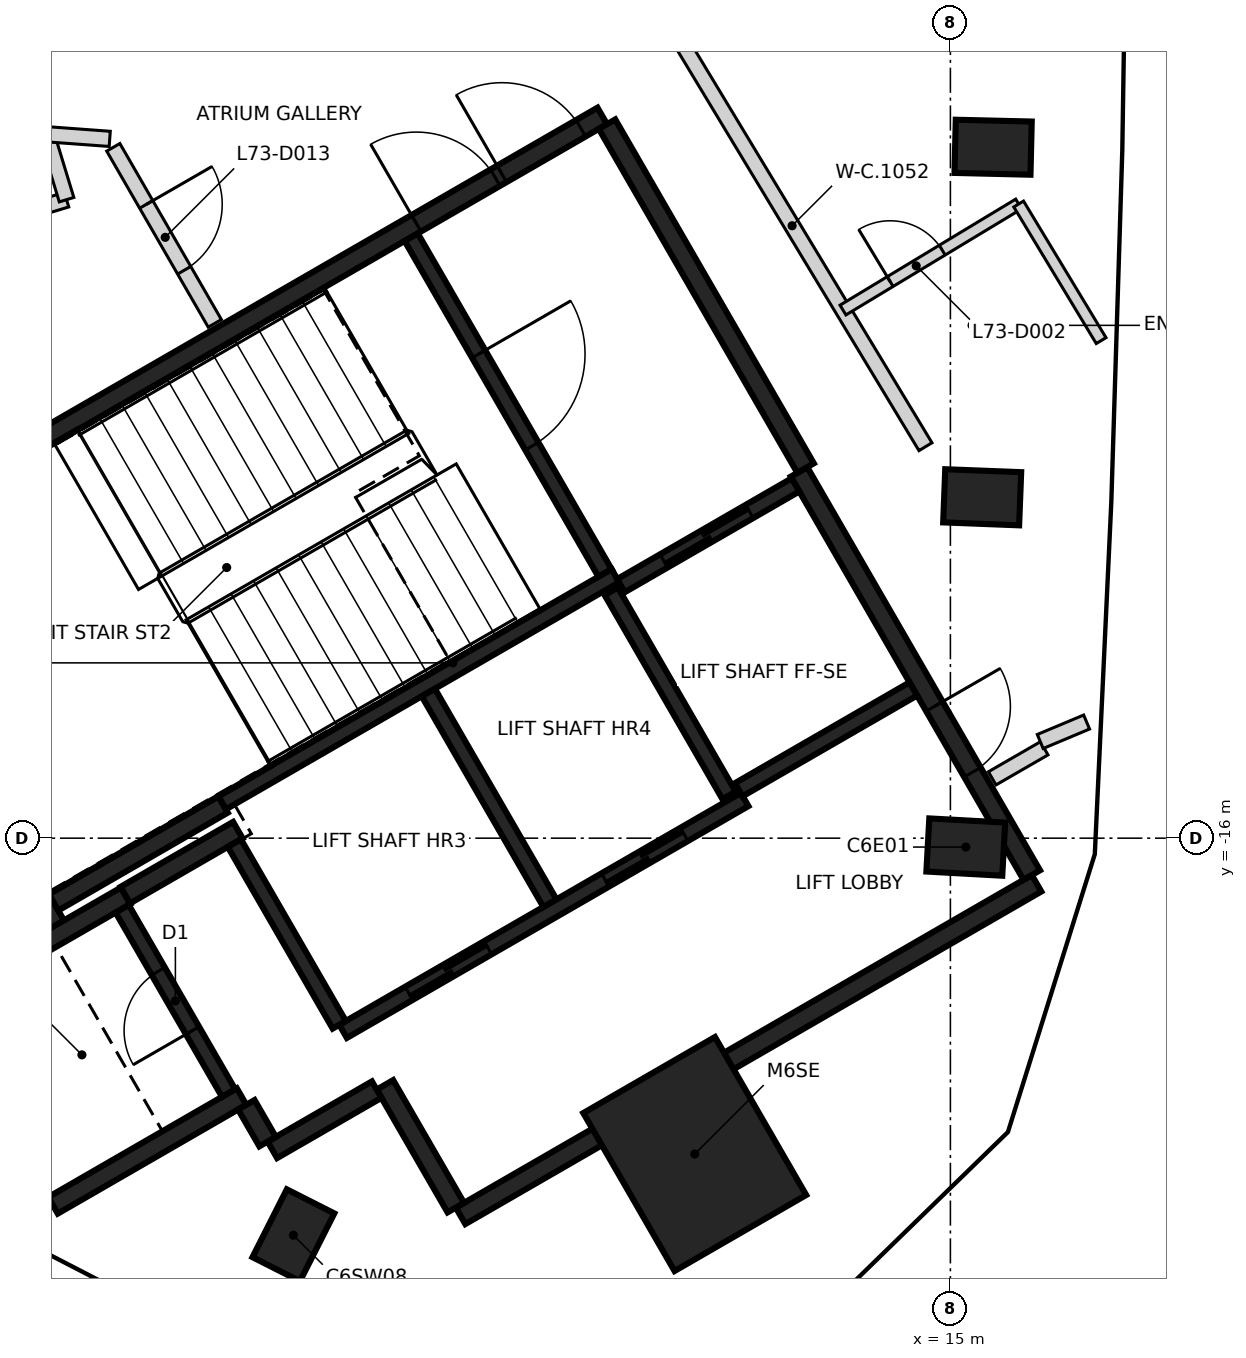
"""IFC4 building model, lengths in metres.
Left out: names, types, materials, properties, quantities, classifications, styles, units other than length and angle.
Written with IfcOpenShell. Run it as: python <this file> out.ifc"""

import sys

from ifc_helpers import new_model, si_unit, direction, frame, frame_2d, origin, origin_2d, place, context, subcontext, project, spatial, rectangle, extrude, element, fill, save


model = new_model("IFC4")
c1 = context("Model", 3, precision=1e-05, world=origin(), true_north=direction((0.0, 1.0)))
c2 = subcontext(c1, "Body", "Model", "MODEL_VIEW")
j1 = project(units=[si_unit("LENGTHUNIT", "METRE"), si_unit("PLANEANGLEUNIT", "RADIAN")], contexts=[c1])
p1 = place(None, origin())
s1 = spatial("IfcSite", under=j1, at=p1, CompositionType="ELEMENT")
p2 = place(p1, origin())
s2 = spatial("IfcBuilding", under=s1, at=p2, CompositionType="ELEMENT")
p3 = place(p2, frame((0.0, 0.0, 291.0)))
s3 = spatial("IfcBuildingStorey", under=s2, at=p3, CompositionType="ELEMENT", Elevation=291.0)
for number, where, z_axis, x_axis in (
    (1, (15.202, -16.117, -0.35), (0.0, 0.0, 1.0), (-0.998, 0.055, 0.0)),
    (2, (15.418, -11.515, -0.35), (0.0, 0.0, 1.0), (-0.999, 0.039, 0.0)),
    (3, (15.562, -6.91, -0.35), (0.0, 0.0, 1.0), (-1.0, 0.024, 0.0)),
    (4, (6.356, -21.224, -0.35), (0.0, 0.0, 1.0), (0.452, 0.892, 0.0)),
):
    element("IfcColumn", number, at=place(p3, frame(where, z_axis=z_axis, x_axis=x_axis)), inside=s3, PredefinedType="COLUMN", context=c2, shape_type="SweptSolid", body=[
        extrude(rectangle(XDim=1.0, YDim=0.7, at=origin_2d()), origin(), (0.0, 0.0, 1.0), 3.6),
    ])
p4 = place(p3, frame((11.637, -20.155, -0.35), z_axis=(0.0, 0.0, 1.0), x_axis=(-0.5, 0.866025403784, 0.0)))
e5 = element("IfcColumn", 5, at=p4, inside=s3, PredefinedType="COLUMN", context=c2, shape_type="SweptSolid", body=[
    extrude(rectangle(XDim=2.4, YDim=2.0, at=origin_2d()), origin(), (0.0, 0.0, 1.0), 3.6),
])
p5 = place(p3, frame((0.417, -12.273, 0.0), z_axis=(0.0, 0.0, 1.0), x_axis=(0.866021906294, 0.500006057782, 0.0)))
e6 = element("IfcWall", 6, at=p5, inside=s3, PredefinedType="SHEAR", context=c2, shape_type="SweptSolid", body=[
    extrude(rectangle(XDim=11.55, YDim=0.25, at=frame_2d((5.775, 0.0))), origin(), (0.0, 0.0, 1.0), 3.25),
])
p6 = place(p5, frame((10.025, 0.0, 0.0)))
e7 = element("IfcOpeningElement", 7, at=p6, cuts=e6, PredefinedType="OPENING", context=c2, shape_type="SweptSolid", body=[
    extrude(rectangle(XDim=1.2, YDim=2.1, at=frame_2d((0.6, 1.05))), frame((0.0, 0.135, 0.0), z_axis=(0.0, -1.0, 0.0), x_axis=(1.0, 0.0, 0.0)), (0.0, 0.0, 1.0), 0.27),
])
p7 = place(p5, frame((8.725, 0.0, 0.0)))
e8 = element("IfcOpeningElement", 8, at=p7, cuts=e6, PredefinedType="OPENING", context=c2, shape_type="SweptSolid", body=[
    extrude(rectangle(XDim=1.2, YDim=2.1, at=frame_2d((0.6, 1.05))), frame((0.0, 0.135, 0.0), z_axis=(0.0, -1.0, 0.0), x_axis=(1.0, 0.0, 0.0)), (0.0, 0.0, 1.0), 0.27),
])
p8 = place(p3, frame((16.133, -16.594, 0.0), z_axis=(0.0, 0.0, 1.0), x_axis=(-0.866022959057, -0.500004234368, 0.0)))
e9 = element("IfcWall", 9, at=p8, inside=s3, PredefinedType="SHEAR", context=c2, shape_type="SweptSolid", body=[
    extrude(rectangle(XDim=8.75, YDim=0.25, at=frame_2d((4.375, 0.0))), origin(), (0.0, 0.0, 1.0), 3.25),
])
p9 = place(p3, frame((13.008, -11.181, 0.0), z_axis=(0.0, 0.0, 1.0), x_axis=(0.500001955336, -0.866024274868, 0.0)))
e10 = element("IfcWall", 10, at=p9, inside=s3, PredefinedType="SHEAR", context=c2, shape_type="SweptSolid", body=[
    extrude(rectangle(XDim=6.125, YDim=0.25, at=frame_2d((3.062, 0.0))), origin(), (0.0, 0.0, 1.0), 3.25),
])
p10 = place(p9, frame((3.563, 0.0, 0.0)))
e11 = element("IfcOpeningElement", 11, at=p10, cuts=e10, PredefinedType="OPENING", context=c2, shape_type="SweptSolid", body=[
    extrude(rectangle(XDim=1.0, YDim=2.1, at=frame_2d((0.5, 1.05))), frame((0.0, 0.135, 0.0), z_axis=(0.0, -1.0, 0.0), x_axis=(1.0, 0.0, 0.0)), (0.0, 0.0, 1.0), 0.27),
])
p11 = place(p3, frame((3.235, -17.153, 0.0), z_axis=(0.0, 0.0, 1.0), x_axis=(-0.500008851346, 0.866020293397, 0.0)))
e12 = element("IfcWall", 12, at=p11, inside=s3, PredefinedType="SHEAR", context=c2, shape_type="SweptSolid", body=[
    extrude(rectangle(XDim=5.51, YDim=0.25, at=frame_2d((2.755, 0.0))), origin(), (0.0, 0.0, 1.0), 3.25),
])
p12 = place(p3, frame((10.483, -6.606, 0.0), z_axis=(0.0, 0.0, 1.0), x_axis=(0.49999885962, -0.866026062182, 0.0)))
e13 = element("IfcWall", 13, at=p12, inside=s3, PredefinedType="SHEAR", context=c2, shape_type="SweptSolid", body=[
    extrude(rectangle(XDim=5.225, YDim=0.25, at=frame_2d((2.612, 0.0))), origin(), (0.0, 0.0, 1.0), 3.25),
])
p13 = place(p3, frame((3.085, -20.894, 0.0), z_axis=(0.0, 0.0, 1.0), x_axis=(-0.499978833458, 0.866037623948, 0.0)))
e14 = element("IfcWall", 14, at=p13, inside=s3, PredefinedType="SHEAR", context=c2, shape_type="SweptSolid", body=[
    extrude(rectangle(XDim=3.05, YDim=0.25, at=frame_2d((1.525, 0.0))), origin(), (0.0, 0.0, 1.0), 3.25),
])
p14 = place(p3, frame((1.669, -18.19, 0.0), z_axis=(0.0, 0.0, 1.0), x_axis=(0.866042235819, 0.499970844928, 0.0)))
e15 = element("IfcWall", 15, at=p14, inside=s3, PredefinedType="SHEAR", context=c2, shape_type="SweptSolid", body=[
    extrude(rectangle(XDim=2.865, YDim=0.25, at=frame_2d((1.432, 0.0))), origin(), (0.0, 0.0, 1.0), 3.25),
])
p15 = place(p3, frame((5.675, -19.399, 0.0), z_axis=(0.0, 0.0, 1.0), x_axis=(-0.866026637627, -0.499997862916, 0.0)))
e16 = element("IfcWall", 16, at=p15, inside=s3, PredefinedType="SHEAR", context=c2, shape_type="SweptSolid", body=[
    extrude(rectangle(XDim=2.865, YDim=0.25, at=frame_2d((1.432, 0.0))), origin(), (0.0, 0.0, 1.0), 3.25),
])
p16 = place(p3, frame((5.431, -15.556, 0.0), z_axis=(0.0, 0.0, 1.0), x_axis=(-0.866022940537, -0.500004266446, 0.0)))
e17 = element("IfcWall", 17, at=p16, inside=s3, PredefinedType="SHEAR", context=c2, shape_type="SweptSolid", body=[
    extrude(rectangle(XDim=2.575, YDim=0.25, at=frame_2d((1.287, 0.0))), origin(), (0.0, 0.0, 1.0), 3.25),
])
p17 = place(p3, frame((8.493, -20.86, 0.0), z_axis=(0.0, 0.0, 1.0), x_axis=(-0.500039802285, 0.866002422705, 0.0)))
e18 = element("IfcWall", 18, at=p17, inside=s3, PredefinedType="SHEAR", context=c2, shape_type="SweptSolid", body=[
    extrude(rectangle(XDim=1.865, YDim=0.25, at=frame_2d((0.932, 0.0))), origin(), (0.0, 0.0, 1.0), 3.25),
])
p18 = place(p3, frame((4.145, -16.749, 0.0), z_axis=(0.0, 0.0, 1.0), x_axis=(0.866038183914, 0.499977863513, 0.0)))
e19 = element("IfcWall", 19, at=p18, inside=s3, PredefinedType="SHEAR", context=c2, shape_type="SweptSolid", body=[
    extrude(rectangle(XDim=1.71, YDim=0.25, at=frame_2d((0.855, 0.0))), origin(), (0.0, 0.0, 1.0), 3.25),
])
p19 = place(p3, frame((7.452, -19.308, 0.0), z_axis=(0.0, 0.0, 1.0), x_axis=(-0.866044474677, -0.49996696679, 0.0)))
e20 = element("IfcWall", 20, at=p19, inside=s3, PredefinedType="SHEAR", context=c2, shape_type="SweptSolid", body=[
    extrude(rectangle(XDim=1.584, YDim=0.25, at=frame_2d((0.792, 0.0))), origin(), (0.0, 0.0, 1.0), 3.25),
])
p20 = place(p3, frame((6.017, -19.992, 0.0), z_axis=(0.0, 0.0, 1.0), x_axis=(-0.500364886717, 0.865814633822, 0.0)))
e21 = element("IfcWall", 21, at=p20, inside=s3, PredefinedType="SHEAR", context=c2, shape_type="SweptSolid", body=[
    extrude(rectangle(XDim=0.559, YDim=0.25, at=frame_2d((0.28, 0.0))), origin(), (0.0, 0.0, 1.0), 3.25),
])
p21 = place(p3, frame((5.419, -15.534, 0.0), z_axis=(0.0, 0.0, 1.0), x_axis=(0.866029065029, 0.499993658486, 0.0)))
e22 = element("IfcWall", 22, at=p21, inside=s3, PredefinedType="SHEAR", context=c2, shape_type="SweptSolid", body=[
    extrude(rectangle(XDim=5.974, YDim=0.2, at=frame_2d((2.987, 0.0))), origin(), (0.0, 0.0, 1.0), 3.25),
])
p22 = place(p3, frame((7.01, -18.542, 0.0), z_axis=(0.0, 0.0, 1.0), x_axis=(0.866030299012, 0.499991521122, 0.0)))
e23 = element("IfcWall", 23, at=p22, inside=s3, PredefinedType="SHEAR", context=c2, shape_type="SweptSolid", body=[
    extrude(rectangle(XDim=6.1, YDim=0.2, at=frame_2d((3.05, 0.0))), origin(), (0.0, 0.0, 1.0), 3.25),
])
p23 = place(p22, frame((1.0, 0.0, 0.0)))
e24 = element("IfcOpeningElement", 24, at=p23, cuts=e23, PredefinedType="OPENING", context=c2, shape_type="SweptSolid", body=[
    extrude(rectangle(XDim=1.2, YDim=2.1, at=frame_2d((0.6, 1.05))), frame((0.0, 0.11, 0.0), z_axis=(0.0, -1.0, 0.0), x_axis=(1.0, 0.0, 0.0)), (0.0, 0.0, 1.0), 0.22),
])
p24 = place(p22, frame((3.982, 0.0, 0.0)))
e25 = element("IfcOpeningElement", 25, at=p24, cuts=e23, PredefinedType="OPENING", context=c2, shape_type="SweptSolid", body=[
    extrude(rectangle(XDim=1.2, YDim=2.1, at=frame_2d((0.6, 1.05))), frame((0.0, 0.11, 0.0), z_axis=(0.0, -1.0, 0.0), x_axis=(1.0, 0.0, 0.0)), (0.0, 0.0, 1.0), 0.22),
])
p25 = place(p3, frame((7.906, -8.094, 0.0), z_axis=(0.0, 0.0, 1.0), x_axis=(0.500027839223, -0.866009330205, 0.0)))
e26 = element("IfcWall", 26, at=p25, inside=s3, PredefinedType="SHEAR", context=c2, shape_type="SweptSolid", body=[
    extrude(rectangle(XDim=5.098, YDim=0.2, at=frame_2d((2.549, 0.0))), origin(), (0.0, 0.0, 1.0), 3.25),
])
p26 = place(p25, frame((1.774, 0.0, 0.0)))
e27 = element("IfcOpeningElement", 27, at=p26, cuts=e26, PredefinedType="OPENING", context=c2, shape_type="SweptSolid", body=[
    extrude(rectangle(XDim=1.4, YDim=2.1, at=frame_2d((0.7, 1.05))), frame((0.0, 0.11, 0.0), z_axis=(0.0, -1.0, 0.0), x_axis=(1.0, 0.0, 0.0)), (0.0, 0.0, 1.0), 0.22),
])
p27 = place(p3, frame((8.132, -14.084, 0.0), z_axis=(0.0, 0.0, 1.0), x_axis=(0.499997778408, -0.866026686418, 0.0)))
e28 = element("IfcWall", 28, at=p27, inside=s3, PredefinedType="SHEAR", context=c2, shape_type="SweptSolid", body=[
    extrude(rectangle(XDim=3.198, YDim=0.2, at=frame_2d((1.599, 0.0))), origin(), (0.0, 0.0, 1.0), 3.25),
])
p28 = place(p3, frame((5.503, -19.352, 0.0), z_axis=(0.0, 0.0, 1.0), x_axis=(-0.499986818241, 0.866033014143, 0.0)))
e29 = element("IfcWall", 29, at=p28, inside=s3, PredefinedType="SHEAR", context=c2, shape_type="SweptSolid", body=[
    extrude(rectangle(XDim=2.798, YDim=0.2, at=frame_2d((1.399, 0.0))), origin(), (0.0, 0.0, 1.0), 3.25),
])
p29 = place(p28, frame((0.949, 0.0, 0.0)))
e30 = element("IfcOpeningElement", 30, at=p29, cuts=e29, PredefinedType="OPENING", context=c2, shape_type="SweptSolid", body=[
    extrude(rectangle(XDim=0.9, YDim=2.1, at=frame_2d((0.45, 1.05))), frame((0.0, 0.11, 0.0), z_axis=(0.0, -1.0, 0.0), x_axis=(1.0, 0.0, 0.0)), (0.0, 0.0, 1.0), 0.22),
])
p30 = place(p3, frame((6.96, -18.455, 0.0), z_axis=(0.0, 0.0, 1.0), x_axis=(-0.499926705758, 0.866067716099, 0.0)))
e31 = element("IfcWall", 31, at=p30, inside=s3, PredefinedType="SHEAR", context=c2, shape_type="SweptSolid", body=[
    extrude(rectangle(XDim=2.759, YDim=0.2, at=frame_2d((1.38, 0.0))), origin(), (0.0, 0.0, 1.0), 3.25),
])
p31 = place(p3, frame((12.088, -15.437, 0.0), z_axis=(0.0, 0.0, 1.0), x_axis=(-0.500026960575, 0.86600983753, 0.0)))
e32 = element("IfcWall", 32, at=p31, inside=s3, PredefinedType="SHEAR", context=c2, shape_type="SweptSolid", body=[
    extrude(rectangle(XDim=3.1, YDim=0.2, at=frame_2d((1.55, 0.0))), origin(), (0.0, 0.0, 1.0), 3.25),
])
p32 = place(p3, frame((10.666, -12.678, 0.0), z_axis=(0.0, 0.0, 1.0), x_axis=(0.866018407898, 0.500012117035, 0.0)))
e33 = element("IfcWall", 33, at=p32, inside=s3, PredefinedType="SHEAR", context=c2, shape_type="SweptSolid", body=[
    extrude(rectangle(XDim=2.651, YDim=0.2, at=frame_2d((1.325, 0.0))), origin(), (0.0, 0.0, 1.0), 3.25),
])
p33 = place(p32, frame((0.652, 0.0, 0.0)))
e34 = element("IfcOpeningElement", 34, at=p33, cuts=e33, PredefinedType="OPENING", context=c2, shape_type="SweptSolid", body=[
    extrude(rectangle(XDim=1.3, YDim=2.1, at=frame_2d((0.65, 1.05))), frame((0.0, 0.11, 0.0), z_axis=(0.0, -1.0, 0.0), x_axis=(1.0, 0.0, 0.0)), (0.0, 0.0, 1.0), 0.22),
])
p34 = place(p3, frame((14.512, -14.037, 0.0), z_axis=(0.0, 0.0, 1.0), x_axis=(-0.866018407898, -0.500012117035, 0.0)))
e35 = element("IfcWall", 35, at=p34, inside=s3, PredefinedType="SHEAR", context=c2, shape_type="SweptSolid", body=[
    extrude(rectangle(XDim=2.651, YDim=0.2, at=frame_2d((1.325, 0.0))), origin(), (0.0, 0.0, 1.0), 3.25),
])
p35 = place(p3, frame((2.591, -7.837, 0.0), z_axis=(0.0, 0.0, 1.0), x_axis=(0.956974070788, 0.290173444409, 0.0)))
e36 = element("IfcWall", 36, at=p35, inside=s3, PredefinedType="PARTITIONING", context=c2, shape_type="SweptSolid", body=[
    extrude(rectangle(XDim=0.816, YDim=0.2, at=frame_2d((0.408, 0.0))), origin(), (0.0, 0.0, 1.0), 3.25),
])
p36 = place(p3, frame((3.11, -6.739, 0.0), z_axis=(0.0, 0.0, 1.0), x_axis=(0.291053676179, -0.95670672496, 0.0)))
e37 = element("IfcWall", 37, at=p36, inside=s3, PredefinedType="PARTITIONING", context=c2, shape_type="SweptSolid", body=[
    extrude(rectangle(XDim=0.9, YDim=0.2, at=frame_2d((0.45, 0.0))), origin(), (0.0, 0.0, 1.0), 3.25),
])
p37 = place(p3, frame((3.11, -6.739, 0.0), z_axis=(0.0, 0.0, 1.0), x_axis=(0.997306047238, -0.073352901386, 0.0)))
e38 = element("IfcWall", 38, at=p37, inside=s3, PredefinedType="PARTITIONING", context=c2, shape_type="SweptSolid", body=[
    extrude(rectangle(XDim=0.832, YDim=0.2, at=frame_2d((0.416, 0.0))), origin(), (0.0, 0.0, 1.0), 3.25),
])
p38 = place(p3, frame((3.987, -6.911, 0.0), z_axis=(0.0, 0.0, 1.0), x_axis=(0.499458942258, -0.866337558345, 0.0)))
e39 = element("IfcWall", 39, at=p38, inside=s3, PredefinedType="PARTITIONING", context=c2, shape_type="SweptSolid", body=[
    extrude(rectangle(XDim=2.674, YDim=0.2, at=frame_2d((1.337, 0.0))), origin(), (0.0, 0.0, 1.0), 3.25),
])
p39 = place(p38, frame((0.867, 0.0, 0.0)))
e40 = element("IfcOpeningElement", 40, at=p39, cuts=e39, PredefinedType="OPENING", context=c2, shape_type="SweptSolid", body=[
    extrude(rectangle(XDim=1.0, YDim=2.1, at=frame_2d((0.5, 1.05))), frame((0.0, 0.11, 0.0), z_axis=(0.0, -1.0, 0.0), x_axis=(1.0, 0.0, 0.0)), (0.0, 0.0, 1.0), 0.22),
])
p40 = place(p3, frame((11.163, -5.036, 0.0), z_axis=(0.0, 0.0, 1.0), x_axis=(0.516730398198, -0.856148173845, 0.0)))
e41 = element("IfcWall", 41, at=p40, inside=s3, PredefinedType="PARTITIONING", context=c2, shape_type="SweptSolid", body=[
    extrude(rectangle(XDim=6.791, YDim=0.2, at=frame_2d((3.396, 0.0))), origin(), (0.0, 0.0, 1.0), 3.25),
])
p41 = place(p3, frame((15.55, -15.213, 0.0), z_axis=(0.0, 0.0, 1.0), x_axis=(0.865989998118, 0.500061319399, 0.0)))
e42 = element("IfcWall", 42, at=p41, inside=s3, PredefinedType="PARTITIONING", context=c2, shape_type="SweptSolid", body=[
    extrude(rectangle(XDim=0.79, YDim=0.2, at=frame_2d((0.395, 0.0))), origin(), (0.0, 0.0, 1.0), 3.25),
])
p42 = place(p3, frame((16.182, -14.728, 0.0), z_axis=(0.0, 0.0, 1.0), x_axis=(0.922058491377, 0.387050563207, 0.0)))
e43 = element("IfcWall", 43, at=p42, inside=s3, PredefinedType="PARTITIONING", context=c2, shape_type="SweptSolid", body=[
    extrude(rectangle(XDim=0.662, YDim=0.2, at=frame_2d((0.331, 0.0))), origin(), (0.0, 0.0, 1.0), 3.25),
])
p43 = place(p3, frame((13.587, -9.052, 0.0), z_axis=(0.0, 0.0, 1.0), x_axis=(0.856117294569, 0.516781557275, 0.0)))
e44 = element("IfcWall", 44, at=p43, inside=s3, PredefinedType="PARTITIONING", context=c2, shape_type="SweptSolid", body=[
    extrude(rectangle(XDim=2.699, YDim=0.15, at=frame_2d((1.35, 0.0))), origin(), (0.0, 0.0, 1.0), 2.35),
])
p44 = place(p43, frame((0.725, 0.0, 0.0)))
e45 = element("IfcOpeningElement", 45, at=p44, cuts=e44, PredefinedType="OPENING", context=c2, shape_type="SweptSolid", body=[
    extrude(rectangle(XDim=0.8, YDim=2.1, at=frame_2d((0.4, 1.05))), frame((0.0, 0.085, 0.0), z_axis=(0.0, -1.0, 0.0), x_axis=(1.0, 0.0, 0.0)), (0.0, 0.0, 1.0), 0.17),
])
p45 = place(p3, frame((15.898, -7.657, 0.0), z_axis=(0.0, 0.0, 1.0), x_axis=(0.516836936411, -0.856083863393, 0.0)))
e46 = element("IfcWall", 46, at=p45, inside=s3, PredefinedType="PARTITIONING", context=c2, shape_type="SweptSolid", body=[
    extrude(rectangle(XDim=2.099, YDim=0.15, at=frame_2d((1.05, 0.0))), origin(), (0.0, 0.0, 1.0), 3.25),
])
p46 = place(p33, origin())
e47 = element("IfcDoor", 47, at=p46, inside=s3, OperationType="SLIDING_TO_RIGHT", PredefinedType="DOOR", context=c2, shape_type="SweptSolid", body=[
    extrude(rectangle(XDim=1.3, YDim=2.1, at=frame_2d((0.65, 1.05))), frame((0.0, 0.025, 0.0), z_axis=(0.0, -1.0, 0.0), x_axis=(1.0, 0.0, 0.0)), (0.0, 0.0, 1.0), 0.05),
])
fill(e34, e47)
p47 = place(p23, origin())
e48 = element("IfcDoor", 48, at=p47, inside=s3, OperationType="DOUBLE_DOOR_SLIDING", PredefinedType="DOOR", context=c2, shape_type="SweptSolid", body=[
    extrude(rectangle(XDim=1.2, YDim=2.1, at=frame_2d((0.6, 1.05))), frame((0.0, 0.025, 0.0), z_axis=(0.0, -1.0, 0.0), x_axis=(1.0, 0.0, 0.0)), (0.0, 0.0, 1.0), 0.05),
])
fill(e24, e48)
p48 = place(p24, origin())
e49 = element("IfcDoor", 49, at=p48, inside=s3, OperationType="DOUBLE_DOOR_SLIDING", PredefinedType="DOOR", context=c2, shape_type="SweptSolid", body=[
    extrude(rectangle(XDim=1.2, YDim=2.1, at=frame_2d((0.6, 1.05))), frame((0.0, 0.025, 0.0), z_axis=(0.0, -1.0, 0.0), x_axis=(1.0, 0.0, 0.0)), (0.0, 0.0, 1.0), 0.05),
])
fill(e25, e49)
p49 = place(p10, origin())
e50 = element("IfcDoor", 50, at=p49, inside=s3, OperationType="SINGLE_SWING_LEFT", PredefinedType="DOOR", context=c2, shape_type="SweptSolid", body=[
    extrude(rectangle(XDim=1.0, YDim=2.1, at=frame_2d((0.5, 1.05))), frame((0.0, 0.025, 0.0), z_axis=(0.0, -1.0, 0.0), x_axis=(1.0, 0.0, 0.0)), (0.0, 0.0, 1.0), 0.05),
])
fill(e11, e50)
p50 = place(p6, origin())
e51 = element("IfcDoor", 51, at=p50, inside=s3, OperationType="SINGLE_SWING_LEFT", PredefinedType="DOOR", context=c2, shape_type="SweptSolid", body=[
    extrude(rectangle(XDim=1.2, YDim=2.1, at=frame_2d((0.6, 1.05))), frame((0.0, 0.025, 0.0), z_axis=(0.0, -1.0, 0.0), x_axis=(1.0, 0.0, 0.0)), (0.0, 0.0, 1.0), 0.05),
])
fill(e7, e51)
p51 = place(p7, origin())
e52 = element("IfcDoor", 52, at=p51, inside=s3, OperationType="SINGLE_SWING_RIGHT", PredefinedType="DOOR", context=c2, shape_type="SweptSolid", body=[
    extrude(rectangle(XDim=1.2, YDim=2.1, at=frame_2d((0.6, 1.05))), frame((0.0, 0.025, 0.0), z_axis=(0.0, -1.0, 0.0), x_axis=(1.0, 0.0, 0.0)), (0.0, 0.0, 1.0), 0.05),
])
fill(e8, e52)
p52 = place(p26, origin())
e53 = element("IfcDoor", 53, at=p52, inside=s3, OperationType="SINGLE_SWING_RIGHT", PredefinedType="DOOR", context=c2, shape_type="SweptSolid", body=[
    extrude(rectangle(XDim=1.4, YDim=2.1, at=frame_2d((0.7, 1.05))), frame((0.0, 0.025, 0.0), z_axis=(0.0, -1.0, 0.0), x_axis=(1.0, 0.0, 0.0)), (0.0, 0.0, 1.0), 0.05),
])
fill(e27, e53)
p53 = place(p29, origin())
e54 = element("IfcDoor", 54, at=p53, inside=s3, OperationType="SINGLE_SWING_LEFT", PredefinedType="DOOR", context=c2, shape_type="SweptSolid", body=[
    extrude(rectangle(XDim=0.9, YDim=2.1, at=frame_2d((0.45, 1.05))), frame((0.0, 0.025, 0.0), z_axis=(0.0, -1.0, 0.0), x_axis=(1.0, 0.0, 0.0)), (0.0, 0.0, 1.0), 0.05),
])
fill(e30, e54)
p54 = place(p44, origin())
e55 = element("IfcDoor", 55, at=p54, inside=s3, OperationType="SINGLE_SWING_LEFT", PredefinedType="DOOR", context=c2, shape_type="SweptSolid", body=[
    extrude(rectangle(XDim=0.8, YDim=2.1, at=frame_2d((0.4, 1.05))), frame((0.0, 0.025, 0.0), z_axis=(0.0, -1.0, 0.0), x_axis=(1.0, 0.0, 0.0)), (0.0, 0.0, 1.0), 0.05),
])
fill(e45, e55)
p55 = place(p39, frame((1.0, 0.0, 0.0), z_axis=(0.0, 0.0, 1.0), x_axis=(-1.0, 0.0, 0.0)))
e56 = element("IfcDoor", 56, at=p55, inside=s3, OperationType="SINGLE_SWING_LEFT", PredefinedType="DOOR", context=c2, shape_type="SweptSolid", body=[
    extrude(rectangle(XDim=1.0, YDim=2.1, at=frame_2d((0.5, 1.05))), frame((0.0, 0.025, 0.0), z_axis=(0.0, -1.0, 0.0), x_axis=(1.0, 0.0, 0.0)), (0.0, 0.0, 1.0), 0.05),
])
fill(e40, e56)
save(model, sys.argv[1])
